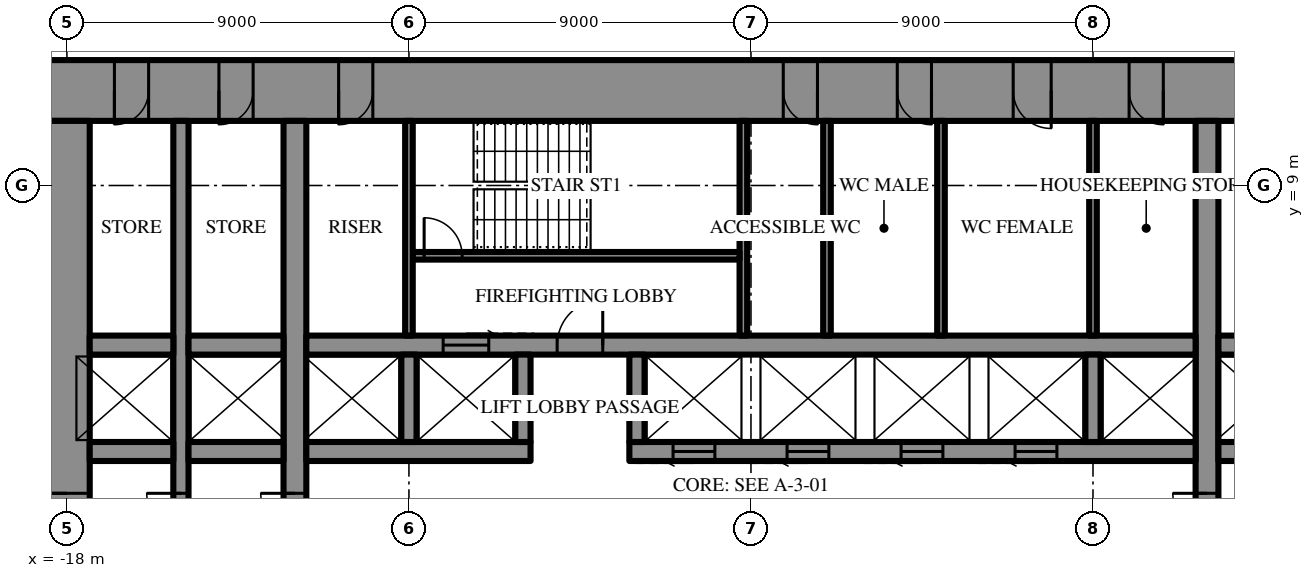
"""IFC4 building model, lengths in metres.
Left out: names, types, materials, properties, quantities, classifications, styles, units other than length and angle.
Written with IfcOpenShell. Run it as: python <this file> out.ifc"""

import sys

from ifc_helpers import new_model, si_unit, direction, frame, frame_2d, origin, place, context, subcontext, project, spatial, rectangle, extrude, element, fill, save


model = new_model("IFC4")
c1 = context("Model", 3, precision=1e-05, world=origin(), true_north=direction((0.0, 1.0)))
c2 = subcontext(c1, "Body", "Model", "MODEL_VIEW")
j1 = project(units=[si_unit("LENGTHUNIT", "METRE"), si_unit("PLANEANGLEUNIT", "RADIAN")], contexts=[c1])
p1 = place(None, origin())
s1 = spatial("IfcSite", under=j1, at=p1, CompositionType="ELEMENT")
p2 = place(p1, origin())
s2 = spatial("IfcBuilding", under=s1, at=p2, CompositionType="ELEMENT")
p3 = place(p2, frame((0.0, 0.0, 44.5)))
s3 = spatial("IfcBuildingStorey", under=s2, at=p3, CompositionType="ELEMENT", Elevation=44.5)
p4 = place(p3, frame((-18.6, 11.5, 0.0), z_axis=(0.0, 0.0, 1.0), x_axis=(1.0, 0.0, 0.0)))
e1 = element("IfcWall", 1, at=p4, inside=s3, PredefinedType="SHEAR", context=c2, shape_type="SweptSolid", body=[
    extrude(rectangle(XDim=37.2, YDim=1.6, at=frame_2d((18.6, 0.0))), origin(), (0.0, 0.0, 1.0), 4.2),
])
p5 = place(p4, frame((19.45, 0.0, 0.0)))
e2 = element("IfcOpeningElement", 2, at=p5, cuts=e1, PredefinedType="OPENING", context=c2, shape_type="SweptSolid", body=[
    extrude(rectangle(XDim=0.9, YDim=2.2, at=frame_2d((0.45, 1.1))), frame((0.0, 0.81, 0.0), z_axis=(0.0, -1.0, 0.0), x_axis=(1.0, 0.0, 0.0)), (0.0, 0.0, 1.0), 1.62),
])
p6 = place(p4, frame((22.45, 0.0, 0.0)))
e3 = element("IfcOpeningElement", 3, at=p6, cuts=e1, PredefinedType="OPENING", context=c2, shape_type="SweptSolid", body=[
    extrude(rectangle(XDim=0.9, YDim=2.2, at=frame_2d((0.45, 1.1))), frame((0.0, 0.81, 0.0), z_axis=(0.0, -1.0, 0.0), x_axis=(1.0, 0.0, 0.0)), (0.0, 0.0, 1.0), 1.62),
])
p7 = place(p4, frame((25.5, 0.0, 0.0)))
e4 = element("IfcOpeningElement", 4, at=p7, cuts=e1, PredefinedType="OPENING", context=c2, shape_type="SweptSolid", body=[
    extrude(rectangle(XDim=1.0, YDim=2.2, at=frame_2d((0.5, 1.1))), frame((0.0, 0.81, 0.0), z_axis=(0.0, -1.0, 0.0), x_axis=(1.0, 0.0, 0.0)), (0.0, 0.0, 1.0), 1.62),
])
p8 = place(p4, frame((1.85, 0.0, 0.0)))
e5 = element("IfcOpeningElement", 5, at=p8, cuts=e1, PredefinedType="OPENING", context=c2, shape_type="SweptSolid", body=[
    extrude(rectangle(XDim=0.9, YDim=2.2, at=frame_2d((0.45, 1.1))), frame((0.0, 0.81, 0.0), z_axis=(0.0, -1.0, 0.0), x_axis=(1.0, 0.0, 0.0)), (0.0, 0.0, 1.0), 1.62),
])
p9 = place(p4, frame((4.6, 0.0, 0.0)))
e6 = element("IfcOpeningElement", 6, at=p9, cuts=e1, PredefinedType="OPENING", context=c2, shape_type="SweptSolid", body=[
    extrude(rectangle(XDim=0.9, YDim=2.2, at=frame_2d((0.45, 1.1))), frame((0.0, 0.81, 0.0), z_axis=(0.0, -1.0, 0.0), x_axis=(1.0, 0.0, 0.0)), (0.0, 0.0, 1.0), 1.62),
])
p10 = place(p4, frame((7.75, 0.0, 0.0)))
e7 = element("IfcOpeningElement", 7, at=p10, cuts=e1, PredefinedType="OPENING", context=c2, shape_type="SweptSolid", body=[
    extrude(rectangle(XDim=0.9, YDim=2.2, at=frame_2d((0.45, 1.1))), frame((0.0, 0.81, 0.0), z_axis=(0.0, -1.0, 0.0), x_axis=(1.0, 0.0, 0.0)), (0.0, 0.0, 1.0), 1.62),
])
p11 = place(p4, frame((28.55, 0.0, 0.0)))
e8 = element("IfcOpeningElement", 8, at=p11, cuts=e1, PredefinedType="OPENING", context=c2, shape_type="SweptSolid", body=[
    extrude(rectangle(XDim=0.9, YDim=2.2, at=frame_2d((0.45, 1.1))), frame((0.0, 0.81, 0.0), z_axis=(0.0, -1.0, 0.0), x_axis=(1.0, 0.0, 0.0)), (0.0, 0.0, 1.0), 1.62),
])
p12 = place(p4, frame((31.7, 0.0, 0.0)))
e9 = element("IfcOpeningElement", 9, at=p12, cuts=e1, PredefinedType="OPENING", context=c2, shape_type="SweptSolid", body=[
    extrude(rectangle(XDim=0.9, YDim=2.2, at=frame_2d((0.45, 1.1))), frame((0.0, 0.81, 0.0), z_axis=(0.0, -1.0, 0.0), x_axis=(1.0, 0.0, 0.0)), (0.0, 0.0, 1.0), 1.62),
])
p13 = place(p4, frame((34.45, 0.0, 0.0)))
e10 = element("IfcOpeningElement", 10, at=p13, cuts=e1, PredefinedType="OPENING", context=c2, shape_type="SweptSolid", body=[
    extrude(rectangle(XDim=0.9, YDim=2.2, at=frame_2d((0.45, 1.1))), frame((0.0, 0.81, 0.0), z_axis=(0.0, -1.0, 0.0), x_axis=(1.0, 0.0, 0.0)), (0.0, 0.0, 1.0), 1.62),
])
p14 = place(p3, frame((-18.0, 10.7, 0.0), z_axis=(0.0, 0.0, 1.0), x_axis=(0.0, -1.0, 0.0)))
e11 = element("IfcWall", 11, at=p14, inside=s3, PredefinedType="SHEAR", context=c2, shape_type="SweptSolid", body=[
    extrude(rectangle(XDim=21.4, YDim=1.2, at=frame_2d((10.7, 0.0))), origin(), (0.0, 0.0, 1.0), 4.2),
])
p15 = place(p14, frame((9.8, 0.0, 0.0)))
e12 = element("IfcOpeningElement", 12, at=p15, cuts=e11, PredefinedType="OPENING", context=c2, shape_type="SweptSolid", body=[
    extrude(rectangle(XDim=1.8, YDim=2.4, at=frame_2d((0.9, 1.2))), frame((0.0, 0.61, 0.0), z_axis=(0.0, -1.0, 0.0), x_axis=(1.0, 0.0, 0.0)), (0.0, 0.0, 1.0), 1.22),
])
p16 = place(p3, frame((12.0, -10.7, 0.0), z_axis=(0.0, 0.0, 1.0), x_axis=(0.0, 1.0, 0.0)))
e13 = element("IfcWall", 13, at=p16, inside=s3, PredefinedType="SHEAR", context=c2, shape_type="SweptSolid", body=[
    extrude(rectangle(XDim=21.4, YDim=0.6, at=frame_2d((10.7, 0.0))), origin(), (0.0, 0.0, 1.0), 4.2),
])
p17 = place(p16, frame((9.8, 0.0, 0.0)))
e14 = element("IfcOpeningElement", 14, at=p17, cuts=e13, PredefinedType="OPENING", context=c2, shape_type="SweptSolid", body=[
    extrude(rectangle(XDim=1.8, YDim=2.4, at=frame_2d((0.9, 1.2))), frame((0.0, 0.31, 0.0), z_axis=(0.0, -1.0, 0.0), x_axis=(1.0, 0.0, 0.0)), (0.0, 0.0, 1.0), 0.62),
])
p18 = place(p3, frame((-12.0, -10.7, 0.0), z_axis=(0.0, 0.0, 1.0), x_axis=(0.0, 1.0, 0.0)))
e15 = element("IfcWall", 15, at=p18, inside=s3, PredefinedType="SHEAR", context=c2, shape_type="SweptSolid", body=[
    extrude(rectangle(XDim=21.4, YDim=0.6, at=frame_2d((10.7, 0.0))), origin(), (0.0, 0.0, 1.0), 4.2),
])
p19 = place(p18, frame((9.8, 0.0, 0.0)))
e16 = element("IfcOpeningElement", 16, at=p19, cuts=e15, PredefinedType="OPENING", context=c2, shape_type="SweptSolid", body=[
    extrude(rectangle(XDim=1.8, YDim=2.4, at=frame_2d((0.9, 1.2))), frame((0.0, 0.31, 0.0), z_axis=(0.0, -1.0, 0.0), x_axis=(1.0, 0.0, 0.0)), (0.0, 0.0, 1.0), 0.62),
])
p20 = place(p3, frame((-15.0, -10.7, 0.0), z_axis=(0.0, 0.0, 1.0), x_axis=(0.0, 1.0, 0.0)))
e17 = element("IfcWall", 17, at=p20, inside=s3, PredefinedType="SHEAR", context=c2, shape_type="SweptSolid", body=[
    extrude(rectangle(XDim=21.4, YDim=0.4, at=frame_2d((10.7, 0.0))), origin(), (0.0, 0.0, 1.0), 4.2),
])
p21 = place(p20, frame((9.8, 0.0, 0.0)))
e18 = element("IfcOpeningElement", 18, at=p21, cuts=e17, PredefinedType="OPENING", context=c2, shape_type="SweptSolid", body=[
    extrude(rectangle(XDim=1.8, YDim=2.4, at=frame_2d((0.9, 1.2))), frame((0.0, 0.21, 0.0), z_axis=(0.0, -1.0, 0.0), x_axis=(1.0, 0.0, 0.0)), (0.0, 0.0, 1.0), 0.42),
])
p22 = place(p3, frame((-17.4, 2.0, 0.0), z_axis=(0.0, 0.0, 1.0), x_axis=(1.0, 0.0, 0.0)))
e19 = element("IfcWall", 19, at=p22, inside=s3, PredefinedType="SHEAR", context=c2, shape_type="SweptSolid", body=[
    extrude(rectangle(XDim=2.2, YDim=0.5, at=frame_2d((1.1, 0.0))), origin(), (0.0, 0.0, 1.0), 4.2),
])
p23 = place(p3, frame((-14.8, 2.0, 0.0), z_axis=(0.0, 0.0, 1.0), x_axis=(1.0, 0.0, 0.0)))
e20 = element("IfcWall", 20, at=p23, inside=s3, PredefinedType="SHEAR", context=c2, shape_type="SweptSolid", body=[
    extrude(rectangle(XDim=2.5, YDim=0.5, at=frame_2d((1.25, 0.0))), origin(), (0.0, 0.0, 1.0), 4.2),
])
p24 = place(p3, frame((-11.7, 2.0, 0.0), z_axis=(0.0, 0.0, 1.0), x_axis=(1.0, 0.0, 0.0)))
e21 = element("IfcWall", 21, at=p24, inside=s3, PredefinedType="SHEAR", context=c2, shape_type="SweptSolid", body=[
    extrude(rectangle(XDim=5.9, YDim=0.5, at=frame_2d((2.95, 0.0))), origin(), (0.0, 0.0, 1.0), 4.2),
])
p25 = place(p3, frame((-3.2, 2.0, 0.0), z_axis=(0.0, 0.0, 1.0), x_axis=(1.0, 0.0, 0.0)))
e22 = element("IfcWall", 22, at=p25, inside=s3, PredefinedType="SHEAR", context=c2, shape_type="SweptSolid", body=[
    extrude(rectangle(XDim=14.9, YDim=0.5, at=frame_2d((7.45, 0.0))), origin(), (0.0, 0.0, 1.0), 4.2),
])
p26 = place(p25, frame((1.15, 0.0, 0.0)))
e23 = element("IfcOpeningElement", 23, at=p26, cuts=e22, PredefinedType="OPENING", context=c2, shape_type="SweptSolid", body=[
    extrude(rectangle(XDim=1.1, YDim=2.2, at=frame_2d((0.55, 1.1))), frame((0.0, 0.26, 0.0), z_axis=(0.0, -1.0, 0.0), x_axis=(1.0, 0.0, 0.0)), (0.0, 0.0, 1.0), 0.52),
])
p27 = place(p25, frame((4.15, 0.0, 0.0)))
e24 = element("IfcOpeningElement", 24, at=p27, cuts=e22, PredefinedType="OPENING", context=c2, shape_type="SweptSolid", body=[
    extrude(rectangle(XDim=1.1, YDim=2.2, at=frame_2d((0.55, 1.1))), frame((0.0, 0.26, 0.0), z_axis=(0.0, -1.0, 0.0), x_axis=(1.0, 0.0, 0.0)), (0.0, 0.0, 1.0), 0.52),
])
p28 = place(p25, frame((7.15, 0.0, 0.0)))
e25 = element("IfcOpeningElement", 25, at=p28, cuts=e22, PredefinedType="OPENING", context=c2, shape_type="SweptSolid", body=[
    extrude(rectangle(XDim=1.1, YDim=2.2, at=frame_2d((0.55, 1.1))), frame((0.0, 0.26, 0.0), z_axis=(0.0, -1.0, 0.0), x_axis=(1.0, 0.0, 0.0)), (0.0, 0.0, 1.0), 0.52),
])
p29 = place(p25, frame((10.15, 0.0, 0.0)))
e26 = element("IfcOpeningElement", 26, at=p29, cuts=e22, PredefinedType="OPENING", context=c2, shape_type="SweptSolid", body=[
    extrude(rectangle(XDim=1.1, YDim=2.2, at=frame_2d((0.55, 1.1))), frame((0.0, 0.26, 0.0), z_axis=(0.0, -1.0, 0.0), x_axis=(1.0, 0.0, 0.0)), (0.0, 0.0, 1.0), 0.52),
])
p30 = place(p3, frame((12.3, 2.0, 0.0), z_axis=(0.0, 0.0, 1.0), x_axis=(1.0, 0.0, 0.0)))
e27 = element("IfcWall", 27, at=p30, inside=s3, PredefinedType="SHEAR", context=c2, shape_type="SweptSolid", body=[
    extrude(rectangle(XDim=2.5, YDim=0.5, at=frame_2d((1.25, 0.0))), origin(), (0.0, 0.0, 1.0), 4.2),
])
p31 = place(p3, frame((-17.4, 4.8, 0.0), z_axis=(0.0, 0.0, 1.0), x_axis=(1.0, 0.0, 0.0)))
e28 = element("IfcWall", 28, at=p31, inside=s3, PredefinedType="SHEAR", context=c2, shape_type="SweptSolid", body=[
    extrude(rectangle(XDim=2.2, YDim=0.5, at=frame_2d((1.1, 0.0))), origin(), (0.0, 0.0, 1.0), 4.2),
])
p32 = place(p3, frame((-14.8, 4.8, 0.0), z_axis=(0.0, 0.0, 1.0), x_axis=(1.0, 0.0, 0.0)))
e29 = element("IfcWall", 29, at=p32, inside=s3, PredefinedType="SHEAR", context=c2, shape_type="SweptSolid", body=[
    extrude(rectangle(XDim=2.5, YDim=0.5, at=frame_2d((1.25, 0.0))), origin(), (0.0, 0.0, 1.0), 4.2),
])
p33 = place(p3, frame((-11.7, 4.8, 0.0), z_axis=(0.0, 0.0, 1.0), x_axis=(1.0, 0.0, 0.0)))
e30 = element("IfcWall", 30, at=p33, inside=s3, PredefinedType="SHEAR", context=c2, shape_type="SweptSolid", body=[
    extrude(rectangle(XDim=23.4, YDim=0.5, at=frame_2d((11.7, 0.0))), origin(), (0.0, 0.0, 1.0), 4.2),
])
p34 = place(p33, frame((6.6, 0.0, 0.0)))
e31 = element("IfcOpeningElement", 31, at=p34, cuts=e30, PredefinedType="OPENING", context=c2, shape_type="SweptSolid", body=[
    extrude(rectangle(XDim=1.2, YDim=2.2, at=frame_2d((0.6, 1.1))), frame((0.0, 0.26, 0.0), z_axis=(0.0, -1.0, 0.0), x_axis=(1.0, 0.0, 0.0)), (0.0, 0.0, 1.0), 0.52),
])
p35 = place(p33, frame((3.6, 0.0, 0.0)))
e32 = element("IfcOpeningElement", 32, at=p35, cuts=e30, PredefinedType="OPENING", context=c2, shape_type="SweptSolid", body=[
    extrude(rectangle(XDim=1.2, YDim=2.2, at=frame_2d((0.6, 1.1))), frame((0.0, 0.26, 0.0), z_axis=(0.0, -1.0, 0.0), x_axis=(1.0, 0.0, 0.0)), (0.0, 0.0, 1.0), 0.52),
])
p36 = place(p3, frame((12.3, 4.8, 0.0), z_axis=(0.0, 0.0, 1.0), x_axis=(1.0, 0.0, 0.0)))
e33 = element("IfcWall", 33, at=p36, inside=s3, PredefinedType="SHEAR", context=c2, shape_type="SweptSolid", body=[
    extrude(rectangle(XDim=2.5, YDim=0.5, at=frame_2d((1.25, 0.0))), origin(), (0.0, 0.0, 1.0), 4.2),
])
for number, where, z_axis, x_axis in (
    (34, (-9.0, 2.25, 0.0), (0.0, 0.0, 1.0), (0.0, 1.0, 0.0)),
    (35, (-6.0, 2.25, 0.0), (0.0, 0.0, 1.0), (0.0, 1.0, 0.0)),
    (36, (-3.0, 2.25, 0.0), (0.0, 0.0, 1.0), (0.0, 1.0, 0.0)),
    (37, (9.0, 2.25, 0.0), (0.0, 0.0, 1.0), (0.0, 1.0, 0.0)),
):
    element("IfcWall", number, at=place(p3, frame(where, z_axis=z_axis, x_axis=x_axis)), inside=s3, PredefinedType="SHEAR", context=c2, shape_type="SweptSolid", body=[
        extrude(rectangle(XDim=2.3, YDim=0.4, at=frame_2d((1.15, 0.0))), origin(), (0.0, 0.0, 1.0), 4.2),
    ])
p37 = place(p3, frame((-0.2, 5.05, 0.0), z_axis=(0.0, 0.0, 1.0), x_axis=(0.0, 1.0, 0.0)))
e38 = element("IfcWall", 38, at=p37, inside=s3, PredefinedType="SHEAR", context=c2, shape_type="SweptSolid", body=[
    extrude(rectangle(XDim=5.65, YDim=0.2, at=frame_2d((2.825, 0.0))), origin(), (0.0, 0.0, 1.0), 4.2),
])
p38 = place(p3, frame((-8.9, 7.15, 0.0), z_axis=(0.0, 0.0, 1.0), x_axis=(1.0, 0.0, 0.0)))
e39 = element("IfcWall", 39, at=p38, inside=s3, PredefinedType="SHEAR", context=c2, shape_type="SweptSolid", body=[
    extrude(rectangle(XDim=8.6, YDim=0.2, at=frame_2d((4.3, 0.0))), origin(), (0.0, 0.0, 1.0), 4.2),
])
p39 = place(p38, frame((0.3, 0.0, 0.0)))
e40 = element("IfcOpeningElement", 40, at=p39, cuts=e39, PredefinedType="OPENING", context=c2, shape_type="SweptSolid", body=[
    extrude(rectangle(XDim=1.0, YDim=2.2, at=frame_2d((0.5, 1.1))), frame((0.0, 0.11, 0.0), z_axis=(0.0, -1.0, 0.0), x_axis=(1.0, 0.0, 0.0)), (0.0, 0.0, 1.0), 0.22),
])
for number, where, z_axis, x_axis in (
    (41, (-9.0, 5.05, 0.0), (0.0, 0.0, 1.0), (0.0, 1.0, 0.0)),
    (42, (9.0, 5.05, 0.0), (0.0, 0.0, 1.0), (0.0, 1.0, 0.0)),
    (43, (2.0, 5.05, 0.0), (0.0, 0.0, 1.0), (0.0, 1.0, 0.0)),
    (44, (5.0, 5.05, 0.0), (0.0, 0.0, 1.0), (0.0, 1.0, 0.0)),
):
    element("IfcWall", number, at=place(p3, frame(where, z_axis=z_axis, x_axis=x_axis)), inside=s3, PredefinedType="PARTITIONING", context=c2, shape_type="SweptSolid", body=[
        extrude(rectangle(XDim=5.65, YDim=0.2, at=frame_2d((2.825, 0.0))), origin(), (0.0, 0.0, 1.0), 4.0),
    ])
p40 = place(p15, frame((1.8, 0.0, 0.0), z_axis=(0.0, 0.0, 1.0), x_axis=(-1.0, 0.0, 0.0)))
e45 = element("IfcDoor", 45, at=p40, inside=s3, OperationType="DOUBLE_DOOR_SINGLE_SWING", PredefinedType="DOOR", context=c2, shape_type="SweptSolid", body=[
    extrude(rectangle(XDim=1.8, YDim=2.4, at=frame_2d((0.9, 1.2))), frame((0.0, 0.025, 0.0), z_axis=(0.0, -1.0, 0.0), x_axis=(1.0, 0.0, 0.0)), (0.0, 0.0, 1.0), 0.05),
])
fill(e12, e45)
p41 = place(p34, origin())
e46 = element("IfcDoor", 46, at=p41, inside=s3, OperationType="SINGLE_SWING_LEFT", PredefinedType="DOOR", context=c2, shape_type="SweptSolid", body=[
    extrude(rectangle(XDim=1.2, YDim=2.2, at=frame_2d((0.6, 1.1))), frame((0.0, 0.025, 0.0), z_axis=(0.0, -1.0, 0.0), x_axis=(1.0, 0.0, 0.0)), (0.0, 0.0, 1.0), 0.05),
])
fill(e31, e46)
p42 = place(p39, origin())
e47 = element("IfcDoor", 47, at=p42, inside=s3, OperationType="SINGLE_SWING_RIGHT", PredefinedType="DOOR", context=c2, shape_type="SweptSolid", body=[
    extrude(rectangle(XDim=1.0, YDim=2.2, at=frame_2d((0.5, 1.1))), frame((0.0, 0.025, 0.0), z_axis=(0.0, -1.0, 0.0), x_axis=(1.0, 0.0, 0.0)), (0.0, 0.0, 1.0), 0.05),
])
fill(e40, e47)
p43 = place(p5, frame((0.9, 0.0, 0.0), z_axis=(0.0, 0.0, 1.0), x_axis=(-1.0, 0.0, 0.0)))
e48 = element("IfcDoor", 48, at=p43, inside=s3, OperationType="SINGLE_SWING_RIGHT", PredefinedType="DOOR", context=c2, shape_type="SweptSolid", body=[
    extrude(rectangle(XDim=0.9, YDim=2.2, at=frame_2d((0.45, 1.1))), frame((0.0, 0.025, 0.0), z_axis=(0.0, -1.0, 0.0), x_axis=(1.0, 0.0, 0.0)), (0.0, 0.0, 1.0), 0.05),
])
fill(e2, e48)
p44 = place(p6, frame((0.9, 0.0, 0.0), z_axis=(0.0, 0.0, 1.0), x_axis=(-1.0, 0.0, 0.0)))
e49 = element("IfcDoor", 49, at=p44, inside=s3, OperationType="SINGLE_SWING_RIGHT", PredefinedType="DOOR", context=c2, shape_type="SweptSolid", body=[
    extrude(rectangle(XDim=0.9, YDim=2.2, at=frame_2d((0.45, 1.1))), frame((0.0, 0.025, 0.0), z_axis=(0.0, -1.0, 0.0), x_axis=(1.0, 0.0, 0.0)), (0.0, 0.0, 1.0), 0.05),
])
fill(e3, e49)
p45 = place(p7, frame((1.0, 0.0, 0.0), z_axis=(0.0, 0.0, 1.0), x_axis=(-1.0, 0.0, 0.0)))
e50 = element("IfcDoor", 50, at=p45, inside=s3, OperationType="SINGLE_SWING_RIGHT", PredefinedType="DOOR", context=c2, shape_type="SweptSolid", body=[
    extrude(rectangle(XDim=1.0, YDim=2.2, at=frame_2d((0.5, 1.1))), frame((0.0, 0.025, 0.0), z_axis=(0.0, -1.0, 0.0), x_axis=(1.0, 0.0, 0.0)), (0.0, 0.0, 1.0), 0.05),
])
fill(e4, e50)
p46 = place(p8, frame((0.9, 0.0, 0.0), z_axis=(0.0, 0.0, 1.0), x_axis=(-1.0, 0.0, 0.0)))
e51 = element("IfcDoor", 51, at=p46, inside=s3, OperationType="SINGLE_SWING_LEFT", PredefinedType="DOOR", context=c2, shape_type="SweptSolid", body=[
    extrude(rectangle(XDim=0.9, YDim=2.2, at=frame_2d((0.45, 1.1))), frame((0.0, 0.025, 0.0), z_axis=(0.0, -1.0, 0.0), x_axis=(1.0, 0.0, 0.0)), (0.0, 0.0, 1.0), 0.05),
])
fill(e5, e51)
p47 = place(p9, frame((0.9, 0.0, 0.0), z_axis=(0.0, 0.0, 1.0), x_axis=(-1.0, 0.0, 0.0)))
e52 = element("IfcDoor", 52, at=p47, inside=s3, OperationType="SINGLE_SWING_LEFT", PredefinedType="DOOR", context=c2, shape_type="SweptSolid", body=[
    extrude(rectangle(XDim=0.9, YDim=2.2, at=frame_2d((0.45, 1.1))), frame((0.0, 0.025, 0.0), z_axis=(0.0, -1.0, 0.0), x_axis=(1.0, 0.0, 0.0)), (0.0, 0.0, 1.0), 0.05),
])
fill(e6, e52)
p48 = place(p10, frame((0.9, 0.0, 0.0), z_axis=(0.0, 0.0, 1.0), x_axis=(-1.0, 0.0, 0.0)))
e53 = element("IfcDoor", 53, at=p48, inside=s3, OperationType="SINGLE_SWING_LEFT", PredefinedType="DOOR", context=c2, shape_type="SweptSolid", body=[
    extrude(rectangle(XDim=0.9, YDim=2.2, at=frame_2d((0.45, 1.1))), frame((0.0, 0.025, 0.0), z_axis=(0.0, -1.0, 0.0), x_axis=(1.0, 0.0, 0.0)), (0.0, 0.0, 1.0), 0.05),
])
fill(e7, e53)
p49 = place(p11, frame((0.9, 0.0, 0.0), z_axis=(0.0, 0.0, 1.0), x_axis=(-1.0, 0.0, 0.0)))
e54 = element("IfcDoor", 54, at=p49, inside=s3, OperationType="SINGLE_SWING_RIGHT", PredefinedType="DOOR", context=c2, shape_type="SweptSolid", body=[
    extrude(rectangle(XDim=0.9, YDim=2.2, at=frame_2d((0.45, 1.1))), frame((0.0, 0.025, 0.0), z_axis=(0.0, -1.0, 0.0), x_axis=(1.0, 0.0, 0.0)), (0.0, 0.0, 1.0), 0.05),
])
fill(e8, e54)
p50 = place(p17, origin())
e55 = element("IfcDoor", 55, at=p50, inside=s3, OperationType="DOUBLE_DOOR_SINGLE_SWING", PredefinedType="DOOR", context=c2, shape_type="SweptSolid", body=[
    extrude(rectangle(XDim=1.8, YDim=2.4, at=frame_2d((0.9, 1.2))), frame((0.0, 0.025, 0.0), z_axis=(0.0, -1.0, 0.0), x_axis=(1.0, 0.0, 0.0)), (0.0, 0.0, 1.0), 0.05),
])
fill(e14, e55)
p51 = place(p19, origin())
e56 = element("IfcDoor", 56, at=p51, inside=s3, OperationType="DOUBLE_DOOR_SINGLE_SWING", PredefinedType="DOOR", context=c2, shape_type="SweptSolid", body=[
    extrude(rectangle(XDim=1.8, YDim=2.4, at=frame_2d((0.9, 1.2))), frame((0.0, 0.025, 0.0), z_axis=(0.0, -1.0, 0.0), x_axis=(1.0, 0.0, 0.0)), (0.0, 0.0, 1.0), 0.05),
])
fill(e16, e56)
p52 = place(p21, origin())
e57 = element("IfcDoor", 57, at=p52, inside=s3, OperationType="DOUBLE_DOOR_SINGLE_SWING", PredefinedType="DOOR", context=c2, shape_type="SweptSolid", body=[
    extrude(rectangle(XDim=1.8, YDim=2.4, at=frame_2d((0.9, 1.2))), frame((0.0, 0.025, 0.0), z_axis=(0.0, -1.0, 0.0), x_axis=(1.0, 0.0, 0.0)), (0.0, 0.0, 1.0), 0.05),
])
fill(e18, e57)
p53 = place(p35, origin())
e58 = element("IfcDoor", 58, at=p53, inside=s3, OperationType="SLIDING_TO_LEFT", PredefinedType="DOOR", context=c2, shape_type="SweptSolid", body=[
    extrude(rectangle(XDim=1.2, YDim=2.2, at=frame_2d((0.6, 1.1))), frame((0.0, 0.025, 0.0), z_axis=(0.0, -1.0, 0.0), x_axis=(1.0, 0.0, 0.0)), (0.0, 0.0, 1.0), 0.05),
])
fill(e32, e58)
p54 = place(p26, frame((1.1, 0.0, 0.0), z_axis=(0.0, 0.0, 1.0), x_axis=(-1.0, 0.0, 0.0)))
e59 = element("IfcDoor", 59, at=p54, inside=s3, OperationType="SLIDING_TO_LEFT", PredefinedType="DOOR", context=c2, shape_type="SweptSolid", body=[
    extrude(rectangle(XDim=1.1, YDim=2.2, at=frame_2d((0.55, 1.1))), frame((0.0, 0.025, 0.0), z_axis=(0.0, -1.0, 0.0), x_axis=(1.0, 0.0, 0.0)), (0.0, 0.0, 1.0), 0.05),
])
fill(e23, e59)
p55 = place(p27, frame((1.1, 0.0, 0.0), z_axis=(0.0, 0.0, 1.0), x_axis=(-1.0, 0.0, 0.0)))
e60 = element("IfcDoor", 60, at=p55, inside=s3, OperationType="SLIDING_TO_LEFT", PredefinedType="DOOR", context=c2, shape_type="SweptSolid", body=[
    extrude(rectangle(XDim=1.1, YDim=2.2, at=frame_2d((0.55, 1.1))), frame((0.0, 0.025, 0.0), z_axis=(0.0, -1.0, 0.0), x_axis=(1.0, 0.0, 0.0)), (0.0, 0.0, 1.0), 0.05),
])
fill(e24, e60)
p56 = place(p28, frame((1.1, 0.0, 0.0), z_axis=(0.0, 0.0, 1.0), x_axis=(-1.0, 0.0, 0.0)))
e61 = element("IfcDoor", 61, at=p56, inside=s3, OperationType="SLIDING_TO_LEFT", PredefinedType="DOOR", context=c2, shape_type="SweptSolid", body=[
    extrude(rectangle(XDim=1.1, YDim=2.2, at=frame_2d((0.55, 1.1))), frame((0.0, 0.025, 0.0), z_axis=(0.0, -1.0, 0.0), x_axis=(1.0, 0.0, 0.0)), (0.0, 0.0, 1.0), 0.05),
])
fill(e25, e61)
p57 = place(p29, frame((1.1, 0.0, 0.0), z_axis=(0.0, 0.0, 1.0), x_axis=(-1.0, 0.0, 0.0)))
e62 = element("IfcDoor", 62, at=p57, inside=s3, OperationType="SLIDING_TO_LEFT", PredefinedType="DOOR", context=c2, shape_type="SweptSolid", body=[
    extrude(rectangle(XDim=1.1, YDim=2.2, at=frame_2d((0.55, 1.1))), frame((0.0, 0.025, 0.0), z_axis=(0.0, -1.0, 0.0), x_axis=(1.0, 0.0, 0.0)), (0.0, 0.0, 1.0), 0.05),
])
fill(e26, e62)
save(model, sys.argv[1])
